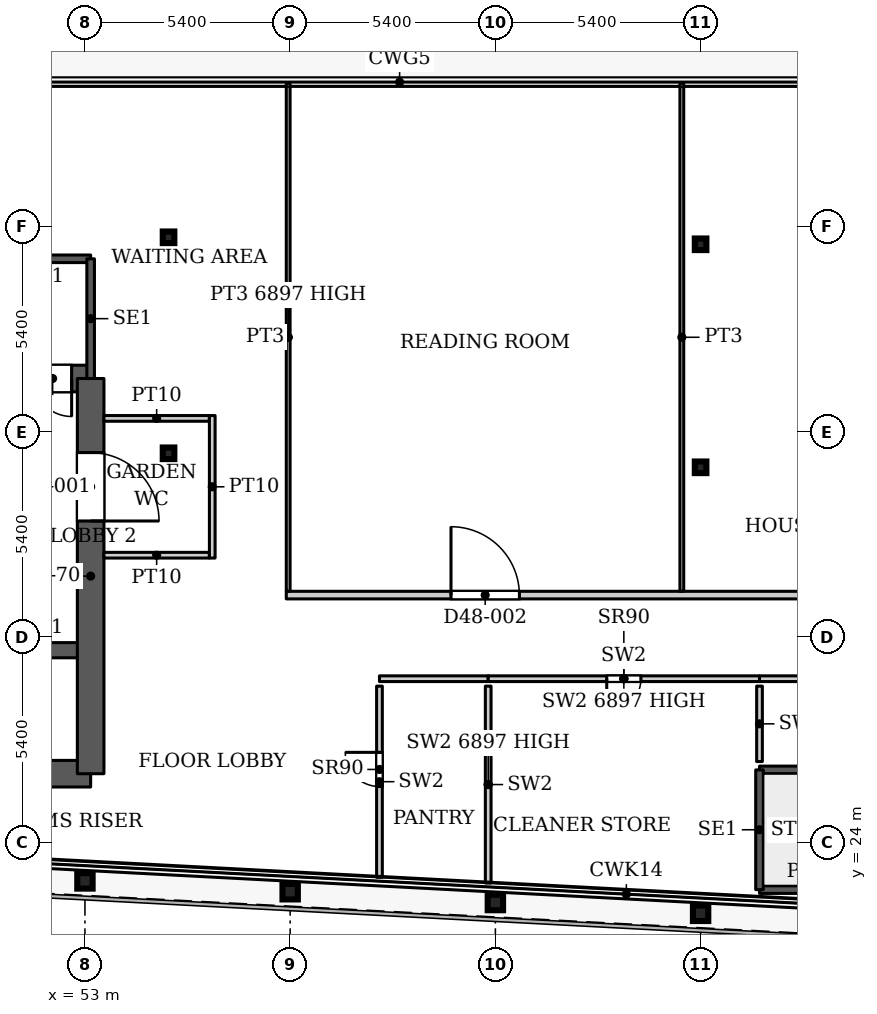
"""IFC4 building model, lengths in metres.
Left out: names, types, materials, properties, quantities, classifications, styles, units other than length and angle.
Written with IfcOpenShell. Run it as: python <this file> out.ifc"""

import sys

from ifc_helpers import new_model, si_unit, direction, frame, frame_2d, origin, origin_2d, place, context, subcontext, project, spatial, rectangle, hollow_rectangle, i_section, extrude, source, transform, mapped, element, fill, save


model = new_model("IFC4")
c1 = context("Model", 3, precision=1e-05, world=origin(), true_north=direction((0.0, 1.0)))
c2 = subcontext(c1, "Body", "Model", "MODEL_VIEW")
j1 = project(units=[si_unit("LENGTHUNIT", "METRE"), si_unit("PLANEANGLEUNIT", "RADIAN")], contexts=[c1])
p1 = place(None, origin())
s1 = spatial("IfcSite", under=j1, at=p1, CompositionType="ELEMENT")
p2 = place(p1, origin())
s2 = spatial("IfcBuilding", under=s1, at=p2, CompositionType="ELEMENT")
p3 = place(p2, frame((0.0, 0.0, 203.3)))
s3 = spatial("IfcBuildingStorey", under=s2, at=p3, CompositionType="ELEMENT", Elevation=203.3)
for number, where, z_axis, x_axis in (
    (1, (69.2, 22.127, 0.0), (0.0, 0.0, 1.0), (1.0, 0.0, 0.0)),
    (2, (63.8, 22.411, 0.0), (0.0, 0.0, 1.0), (1.0, 0.0, 0.0)),
    (3, (58.4, 22.695, 0.0), (0.0, 0.0, 1.0), (1.0, 0.0, 0.0)),
    (4, (53.0, 22.98, 0.0), (0.0, 0.0, 1.0), (1.0, 0.0, 0.0)),
):
    element("IfcColumn", number, at=place(p3, frame(where, z_axis=z_axis, x_axis=x_axis)), inside=s3, PredefinedType="COLUMN", context=c2, shape_type="SweptSolid", body=[
        extrude(i_section(OverallWidth=0.404, OverallDepth=0.407, WebThickness=0.027, FlangeThickness=0.044, FilletRadius=0.012, at=origin_2d()), origin(), (0.0, 0.0, 1.0), 7.8),
    ])
for number, where, z_axis, x_axis in (
    (5, (69.2, 33.863, 0.0), (0.0, 0.0, 1.0), (1.0, 0.0, 0.0)),
    (6, (55.2, 34.232, 0.0), (0.0, 0.0, 1.0), (1.0, 0.0, 0.0)),
    (7, (69.2, 39.732, 0.0), (0.0, 0.0, 1.0), (1.0, 0.0, 0.0)),
    (8, (55.2, 39.916, 0.0), (0.0, 0.0, 1.0), (1.0, 0.0, 0.0)),
):
    element("IfcColumn", number, at=place(p3, frame(where, z_axis=z_axis, x_axis=x_axis)), inside=s3, PredefinedType="COLUMN", context=c2, shape_type="SweptSolid", body=[
        extrude(hollow_rectangle(XDim=0.305, YDim=0.305, WallThickness=0.016, InnerFilletRadius=0.016, OuterFilletRadius=0.032, at=origin_2d()), origin(), (0.0, 0.0, 1.0), 7.8),
    ])
p4 = place(p3, frame((34.75, 25.8, 0.0), z_axis=(0.0, 0.0, 1.0), x_axis=(1.0, 0.0, 0.0)))
e9 = element("IfcWall", 9, at=p4, inside=s3, PredefinedType="SHEAR", context=c2, shape_type="SweptSolid", body=[
    extrude(rectangle(XDim=18.4, YDim=0.7, at=frame_2d((9.2, 0.0))), origin(), (0.0, 0.0, 1.0), 7.8),
])
p5 = place(p3, frame((34.75, 29.05, 0.0), z_axis=(0.0, 0.0, 1.0), x_axis=(1.0, 0.0, 0.0)))
e10 = element("IfcWall", 10, at=p5, inside=s3, PredefinedType="SHEAR", context=c2, shape_type="SweptSolid", body=[
    extrude(rectangle(XDim=18.4, YDim=0.4, at=frame_2d((9.2, 0.0))), origin(), (0.0, 0.0, 1.0), 7.8),
])
p6 = place(p5, frame((0.875, 0.0, 0.0)))
e11 = element("IfcOpeningElement", 11, at=p6, cuts=e10, PredefinedType="OPENING", context=c2, shape_type="SweptSolid", body=[
    extrude(rectangle(XDim=1.1, YDim=2.2, at=frame_2d((0.55, 1.1))), frame((0.0, 0.21, 0.0), z_axis=(0.0, -1.0, 0.0), x_axis=(1.0, 0.0, 0.0)), (0.0, 0.0, 1.0), 0.42),
])
p7 = place(p5, frame((3.725, 0.0, 0.0)))
e12 = element("IfcOpeningElement", 12, at=p7, cuts=e10, PredefinedType="OPENING", context=c2, shape_type="SweptSolid", body=[
    extrude(rectangle(XDim=1.1, YDim=2.2, at=frame_2d((0.55, 1.1))), frame((0.0, 0.21, 0.0), z_axis=(0.0, -1.0, 0.0), x_axis=(1.0, 0.0, 0.0)), (0.0, 0.0, 1.0), 0.42),
])
p8 = place(p5, frame((6.575, 0.0, 0.0)))
e13 = element("IfcOpeningElement", 13, at=p8, cuts=e10, PredefinedType="OPENING", context=c2, shape_type="SweptSolid", body=[
    extrude(rectangle(XDim=1.1, YDim=2.2, at=frame_2d((0.55, 1.1))), frame((0.0, 0.21, 0.0), z_axis=(0.0, -1.0, 0.0), x_axis=(1.0, 0.0, 0.0)), (0.0, 0.0, 1.0), 0.42),
])
p9 = place(p5, frame((9.425, 0.0, 0.0)))
e14 = element("IfcOpeningElement", 14, at=p9, cuts=e10, PredefinedType="OPENING", context=c2, shape_type="SweptSolid", body=[
    extrude(rectangle(XDim=1.1, YDim=2.2, at=frame_2d((0.55, 1.1))), frame((0.0, 0.21, 0.0), z_axis=(0.0, -1.0, 0.0), x_axis=(1.0, 0.0, 0.0)), (0.0, 0.0, 1.0), 0.42),
])
p10 = place(p5, frame((12.275, 0.0, 0.0)))
e15 = element("IfcOpeningElement", 15, at=p10, cuts=e10, PredefinedType="OPENING", context=c2, shape_type="SweptSolid", body=[
    extrude(rectangle(XDim=1.1, YDim=2.2, at=frame_2d((0.55, 1.1))), frame((0.0, 0.21, 0.0), z_axis=(0.0, -1.0, 0.0), x_axis=(1.0, 0.0, 0.0)), (0.0, 0.0, 1.0), 0.42),
])
p11 = place(p5, frame((15.125, 0.0, 0.0)))
e16 = element("IfcOpeningElement", 16, at=p11, cuts=e10, PredefinedType="OPENING", context=c2, shape_type="SweptSolid", body=[
    extrude(rectangle(XDim=1.1, YDim=2.2, at=frame_2d((0.55, 1.1))), frame((0.0, 0.21, 0.0), z_axis=(0.0, -1.0, 0.0), x_axis=(1.0, 0.0, 0.0)), (0.0, 0.0, 1.0), 0.42),
])
p12 = place(p3, frame((34.75, 36.2, 0.0), z_axis=(0.0, 0.0, 1.0), x_axis=(1.0, 0.0, 0.0)))
e17 = element("IfcWall", 17, at=p12, inside=s3, PredefinedType="SHEAR", context=c2, shape_type="SweptSolid", body=[
    extrude(rectangle(XDim=18.4, YDim=0.7, at=frame_2d((9.2, 0.0))), origin(), (0.0, 0.0, 1.0), 7.8),
])
p13 = place(p12, frame((16.9, 0.0, 0.0)))
e18 = element("IfcOpeningElement", 18, at=p13, cuts=e17, PredefinedType="OPENING", context=c2, shape_type="SweptSolid", body=[
    extrude(rectangle(XDim=1.0, YDim=2.2, at=frame_2d((0.5, 1.1))), frame((0.0, 0.36, 0.0), z_axis=(0.0, -1.0, 0.0), x_axis=(1.0, 0.0, 0.0)), (0.0, 0.0, 1.0), 0.72),
])
p14 = place(p3, frame((53.15, 25.8, 0.0), z_axis=(0.0, 0.0, 1.0), x_axis=(0.0, 1.0, 0.0)))
e19 = element("IfcWall", 19, at=p14, inside=s3, PredefinedType="SHEAR", context=c2, shape_type="SweptSolid", body=[
    extrude(rectangle(XDim=10.4, YDim=0.7, at=frame_2d((5.2, 0.0))), origin(), (0.0, 0.0, 1.0), 7.8),
])
p15 = place(p14, frame((6.65, 0.0, 0.0)))
e20 = element("IfcOpeningElement", 20, at=p15, cuts=e19, PredefinedType="OPENING", context=c2, shape_type="SweptSolid", body=[
    extrude(rectangle(XDim=1.8, YDim=2.1, at=frame_2d((0.9, 1.05))), frame((0.0, 0.36, 0.0), z_axis=(0.0, -1.0, 0.0), x_axis=(1.0, 0.0, 0.0)), (0.0, 0.0, 1.0), 0.72),
])
p16 = place(p3, frame((43.99, 39.35, 0.0), z_axis=(0.0, 0.0, 1.0), x_axis=(1.0, 0.0, 0.0)))
e21 = element("IfcWall", 21, at=p16, inside=s3, PredefinedType="SHEAR", context=c2, shape_type="SweptSolid", body=[
    extrude(rectangle(XDim=9.16, YDim=0.2, at=frame_2d((4.58, 0.0))), origin(), (0.0, 0.0, 1.0), 7.8),
])
p17 = place(p3, frame((53.15, 36.2, 0.0), z_axis=(0.0, 0.0, 1.0), x_axis=(0.0, 1.0, 0.0)))
e22 = element("IfcWall", 22, at=p17, inside=s3, PredefinedType="SHEAR", context=c2, shape_type="SweptSolid", body=[
    extrude(rectangle(XDim=3.15, YDim=0.2, at=frame_2d((1.575, 0.0))), origin(), (0.0, 0.0, 1.0), 7.8),
])
p18 = place(p3, frame((70.75, 22.75, 0.0), z_axis=(0.0, 0.0, 1.0), x_axis=(1.0, 0.0, 0.0)))
e23 = element("IfcWall", 23, at=p18, inside=s3, PredefinedType="SHEAR", context=c2, shape_type="SweptSolid", body=[
    extrude(rectangle(XDim=9.16, YDim=0.2, at=frame_2d((4.58, 0.0))), origin(), (0.0, 0.0, 1.0), 7.8),
])
p19 = place(p3, frame((70.75, 25.9, 0.0), z_axis=(0.0, 0.0, 1.0), x_axis=(1.0, 0.0, 0.0)))
e24 = element("IfcWall", 24, at=p19, inside=s3, PredefinedType="SHEAR", context=c2, shape_type="SweptSolid", body=[
    extrude(rectangle(XDim=9.16, YDim=0.2, at=frame_2d((4.58, 0.0))), origin(), (0.0, 0.0, 1.0), 7.8),
])
p20 = place(p19, frame((7.81, 0.0, 0.0)))
e25 = element("IfcOpeningElement", 25, at=p20, cuts=e24, PredefinedType="OPENING", context=c2, shape_type="SweptSolid", body=[
    extrude(rectangle(XDim=1.1, YDim=2.2, at=frame_2d((0.55, 1.1))), frame((0.0, 0.11, 0.0), z_axis=(0.0, -1.0, 0.0), x_axis=(1.0, 0.0, 0.0)), (0.0, 0.0, 1.0), 0.22),
])
p21 = place(p3, frame((70.75, 22.75, 0.0), z_axis=(0.0, 0.0, 1.0), x_axis=(0.0, 1.0, 0.0)))
e26 = element("IfcWall", 26, at=p21, inside=s3, PredefinedType="SHEAR", context=c2, shape_type="SweptSolid", body=[
    extrude(rectangle(XDim=3.15, YDim=0.2, at=frame_2d((1.575, 0.0))), origin(), (0.0, 0.0, 1.0), 7.8),
])
p22 = place(p3, frame((60.75, 28.3, 0.0), z_axis=(0.0, 0.0, 1.0), x_axis=(1.0, 0.0, 0.0)))
e27 = element("IfcWall", 27, at=p22, inside=s3, PredefinedType="PARTITIONING", context=c2, shape_type="SweptSolid", body=[
    extrude(rectangle(XDim=2.861, YDim=0.15, at=frame_2d((1.431, 0.0))), origin(), (0.0, 0.0, 1.0), 7.8),
])
p23 = place(p3, frame((60.75, 23.075, 0.0), z_axis=(0.0, 0.0, 1.0), x_axis=(0.0, 1.0, 0.0)))
e28 = element("IfcWall", 28, at=p23, inside=s3, PredefinedType="PARTITIONING", context=c2, shape_type="SweptSolid", body=[
    extrude(rectangle(XDim=5.03, YDim=0.15, at=frame_2d((2.515, 0.0))), origin(), (0.0, 0.0, 1.0), 7.8),
])
p24 = place(p23, frame((2.387, 0.0, 0.0)))
e29 = element("IfcOpeningElement", 29, at=p24, cuts=e28, PredefinedType="OPENING", context=c2, shape_type="SweptSolid", body=[
    extrude(rectangle(XDim=0.9, YDim=2.2, at=frame_2d((0.45, 1.1))), frame((0.0, 0.085, 0.0), z_axis=(0.0, -1.0, 0.0), x_axis=(1.0, 0.0, 0.0)), (0.0, 0.0, 1.0), 0.17),
])
p25 = place(p3, frame((63.611, 22.924, 0.0), z_axis=(0.0, 0.0, 1.0), x_axis=(0.0, 1.0, 0.0)))
e30 = element("IfcWall", 30, at=p25, inside=s3, PredefinedType="PARTITIONING", context=c2, shape_type="SweptSolid", body=[
    extrude(rectangle(XDim=5.181, YDim=0.15, at=frame_2d((2.59, 0.0))), origin(), (0.0, 0.0, 1.0), 6.897),
])
p26 = place(p3, frame((63.611, 28.3, 0.0), z_axis=(0.0, 0.0, 1.0), x_axis=(1.0, 0.0, 0.0)))
e31 = element("IfcWall", 31, at=p26, inside=s3, PredefinedType="PARTITIONING", context=c2, shape_type="SweptSolid", body=[
    extrude(rectangle(XDim=7.139, YDim=0.15, at=frame_2d((3.569, 0.0))), origin(), (0.0, 0.0, 1.0), 6.897),
])
p27 = place(p26, frame((3.119, 0.0, 0.0)))
e32 = element("IfcOpeningElement", 32, at=p27, cuts=e31, PredefinedType="OPENING", context=c2, shape_type="SweptSolid", body=[
    extrude(rectangle(XDim=0.9, YDim=2.2, at=frame_2d((0.45, 1.1))), frame((0.0, 0.085, 0.0), z_axis=(0.0, -1.0, 0.0), x_axis=(1.0, 0.0, 0.0)), (0.0, 0.0, 1.0), 0.17),
])
p28 = place(p3, frame((70.75, 26.12, 0.0), z_axis=(0.0, 0.0, 1.0), x_axis=(0.0, 1.0, 0.0)))
e33 = element("IfcWall", 33, at=p28, inside=s3, PredefinedType="PARTITIONING", context=c2, shape_type="SweptSolid", body=[
    extrude(rectangle(XDim=1.985, YDim=0.15, at=frame_2d((0.992, 0.0))), origin(), (0.0, 0.0, 1.0), 7.8),
])
p29 = place(p3, frame((70.75, 28.3, 0.0), z_axis=(0.0, 0.0, 1.0), x_axis=(1.0, 0.0, 0.0)))
e34 = element("IfcWall", 34, at=p29, inside=s3, PredefinedType="PARTITIONING", context=c2, shape_type="SweptSolid", body=[
    extrude(rectangle(XDim=5.76, YDim=0.15, at=frame_2d((2.88, 0.0))), origin(), (0.0, 0.0, 1.0), 7.8),
])
p30 = place(p29, frame((2.43, 0.0, 0.0)))
e35 = element("IfcOpeningElement", 35, at=p30, cuts=e34, PredefinedType="OPENING", context=c2, shape_type="SweptSolid", body=[
    extrude(rectangle(XDim=0.9, YDim=2.2, at=frame_2d((0.45, 1.1))), frame((0.0, 0.085, 0.0), z_axis=(0.0, -1.0, 0.0), x_axis=(1.0, 0.0, 0.0)), (0.0, 0.0, 1.0), 0.17),
])
for number, where, z_axis, x_axis in (
    (36, (53.499, 31.55, 0.0), (0.0, 0.0, 1.0), (1.0, 0.0, 0.0)),
    (37, (53.499, 35.15, 0.0), (0.0, 0.0, 1.0), (1.0, 0.0, 0.0)),
):
    element("IfcWall", number, at=place(p3, frame(where, z_axis=z_axis, x_axis=x_axis)), inside=s3, PredefinedType="PARTITIONING", context=c2, shape_type="SweptSolid", body=[
        extrude(rectangle(XDim=2.776, YDim=0.15, at=frame_2d((1.388, 0.0))), origin(), (0.0, 0.0, 1.0), 7.5),
    ])
p31 = place(p3, frame((56.35, 31.475, 0.0), z_axis=(0.0, 0.0, 1.0), x_axis=(0.0, 1.0, 0.0)))
e38 = element("IfcWall", 38, at=p31, inside=s3, PredefinedType="PARTITIONING", context=c2, shape_type="SweptSolid", body=[
    extrude(rectangle(XDim=3.75, YDim=0.15, at=frame_2d((1.875, 0.0))), origin(), (0.0, 0.0, 1.0), 7.5),
])
p32 = place(p3, frame((58.298, 30.5, 0.0), z_axis=(0.0, 0.0, 1.0), x_axis=(1.0, 0.0, 0.0)))
e39 = element("IfcWall", 39, at=p32, inside=s3, PredefinedType="PARTITIONING", context=c2, shape_type="SweptSolid", body=[
    extrude(rectangle(XDim=39.802, YDim=0.2, at=frame_2d((19.901, 0.0))), origin(), (0.0, 0.0, 1.0), 7.5),
])
p33 = place(p32, frame((4.334, 0.0, 0.0)))
e40 = element("IfcOpeningElement", 40, at=p33, cuts=e39, PredefinedType="OPENING", context=c2, shape_type="SweptSolid", body=[
    extrude(rectangle(XDim=1.8, YDim=2.1, at=frame_2d((0.9, 1.05))), frame((0.0, 0.11, 0.0), z_axis=(0.0, -1.0, 0.0), x_axis=(1.0, 0.0, 0.0)), (0.0, 0.0, 1.0), 0.22),
])
p34 = place(p32, frame((14.692, 0.0, 0.0)))
e41 = element("IfcOpeningElement", 41, at=p34, cuts=e39, PredefinedType="OPENING", context=c2, shape_type="SweptSolid", body=[
    extrude(rectangle(XDim=1.8, YDim=2.1, at=frame_2d((0.9, 1.05))), frame((0.0, 0.11, 0.0), z_axis=(0.0, -1.0, 0.0), x_axis=(1.0, 0.0, 0.0)), (0.0, 0.0, 1.0), 0.22),
])
p35 = place(p32, frame((25.05, 0.0, 0.0)))
e42 = element("IfcOpeningElement", 42, at=p35, cuts=e39, PredefinedType="OPENING", context=c2, shape_type="SweptSolid", body=[
    extrude(rectangle(XDim=1.8, YDim=2.1, at=frame_2d((0.9, 1.05))), frame((0.0, 0.11, 0.0), z_axis=(0.0, -1.0, 0.0), x_axis=(1.0, 0.0, 0.0)), (0.0, 0.0, 1.0), 0.22),
])
p36 = place(p32, frame((35.618, 0.0, 0.0)))
e43 = element("IfcOpeningElement", 43, at=p36, cuts=e39, PredefinedType="OPENING", context=c2, shape_type="SweptSolid", body=[
    extrude(rectangle(XDim=1.8, YDim=2.1, at=frame_2d((0.9, 1.05))), frame((0.0, 0.11, 0.0), z_axis=(0.0, -1.0, 0.0), x_axis=(1.0, 0.0, 0.0)), (0.0, 0.0, 1.0), 0.22),
])
p37 = place(p3, frame((58.348, 30.6, 0.0), z_axis=(0.0, 0.0, 1.0), x_axis=(0.0, 1.0, 0.0)))
e44 = element("IfcWall", 44, at=p37, inside=s3, PredefinedType="PARTITIONING", context=c2, shape_type="SweptSolid", body=[
    extrude(rectangle(XDim=13.37, YDim=0.1, at=frame_2d((6.685, 0.0))), origin(), (0.0, 0.0, 1.0), 6.897),
])
p38 = place(p3, frame((68.706, 30.6, 0.0), z_axis=(0.0, 0.0, 1.0), x_axis=(0.0, 1.0, 0.0)))
e45 = element("IfcWall", 45, at=p38, inside=s3, PredefinedType="PARTITIONING", context=c2, shape_type="SweptSolid", body=[
    extrude(rectangle(XDim=13.37, YDim=0.1, at=frame_2d((6.685, 0.0))), origin(), (0.0, 0.0, 1.0), 7.5),
])
m1 = source(origin(), c2, "Body", "SweptSolid", [
    extrude(rectangle(XDim=0.9, YDim=2.2, at=frame_2d((0.45, 1.1))), frame((0.0, 0.025, 0.0), z_axis=(0.0, -1.0, 0.0), x_axis=(1.0, 0.0, 0.0)), (0.0, 0.0, 1.0), 0.05),
])
p39 = place(p24, origin())
e46 = element("IfcDoor", 46, at=p39, inside=s3, OperationType="SINGLE_SWING_LEFT", PredefinedType="DOOR", context=c2, shape_type="MappedRepresentation", body=[
    mapped(m1, transform((0.0, 0.0, 0.0), x_axis=(1.0, 0.0, 0.0), y_axis=(0.0, 1.0, 0.0), z_axis=(0.0, 0.0, 1.0), scale=1.0)),
])
fill(e29, e46)
p40 = place(p27, origin())
e47 = element("IfcDoor", 47, at=p40, inside=s3, OperationType="SINGLE_SWING_RIGHT", PredefinedType="DOOR", context=c2, shape_type="MappedRepresentation", body=[
    mapped(m1, transform((0.0, 0.0, 0.0), x_axis=(1.0, 0.0, 0.0), y_axis=(0.0, 1.0, 0.0), z_axis=(0.0, 0.0, 1.0), scale=1.0)),
])
fill(e32, e47)
m2 = source(origin(), c2, "Body", "SweptSolid", [
    extrude(rectangle(XDim=1.0, YDim=2.2, at=frame_2d((0.5, 1.1))), frame((0.0, 0.025, 0.0), z_axis=(0.0, -1.0, 0.0), x_axis=(1.0, 0.0, 0.0)), (0.0, 0.0, 1.0), 0.05),
])
p41 = place(p13, origin())
e48 = element("IfcDoor", 48, at=p41, inside=s3, OperationType="SINGLE_SWING_RIGHT", PredefinedType="DOOR", context=c2, shape_type="MappedRepresentation", body=[
    mapped(m2, transform((0.0, 0.0, 0.0), x_axis=(1.0, 0.0, 0.0), y_axis=(0.0, 1.0, 0.0), z_axis=(0.0, 0.0, 1.0), scale=1.0)),
])
fill(e18, e48)
m3 = source(origin(), c2, "Body", "SweptSolid", [
    extrude(rectangle(XDim=1.8, YDim=2.1, at=frame_2d((0.9, 1.05))), frame((0.0, 0.025, 0.0), z_axis=(0.0, -1.0, 0.0), x_axis=(1.0, 0.0, 0.0)), (0.0, 0.0, 1.0), 0.05),
])
p42 = place(p15, origin())
e49 = element("IfcDoor", 49, at=p42, inside=s3, OperationType="DOUBLE_DOOR_SINGLE_SWING", PredefinedType="DOOR", context=c2, shape_type="MappedRepresentation", body=[
    mapped(m3, transform((0.0, 0.0, 0.0), x_axis=(1.0, 0.0, 0.0), y_axis=(0.0, 1.0, 0.0), z_axis=(0.0, 0.0, 1.0), scale=1.0)),
])
fill(e20, e49)
m4 = source(origin(), c2, "Body", "SweptSolid", [
    extrude(rectangle(XDim=1.8, YDim=2.1, at=frame_2d((0.9, 1.05))), frame((0.0, 0.025, 0.0), z_axis=(0.0, -1.0, 0.0), x_axis=(1.0, 0.0, 0.0)), (0.0, 0.0, 1.0), 0.05),
])
p43 = place(p33, origin())
e50 = element("IfcDoor", 50, at=p43, inside=s3, OperationType="DOUBLE_DOOR_SINGLE_SWING", PredefinedType="DOOR", context=c2, shape_type="MappedRepresentation", body=[
    mapped(m4, transform((0.0, 0.0, 0.0), x_axis=(1.0, 0.0, 0.0), y_axis=(0.0, 1.0, 0.0), z_axis=(0.0, 0.0, 1.0), scale=1.0)),
])
fill(e40, e50)
save(model, sys.argv[1])
